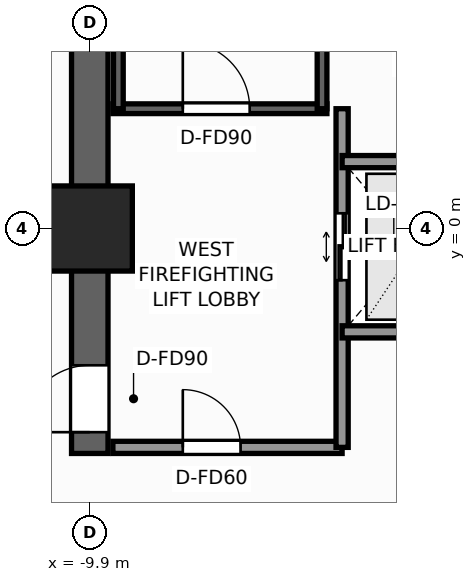
"""IFC4 building model, lengths in metres.
Left out: names, types, materials, properties, quantities, classifications, styles, units other than length and angle.
Written with IfcOpenShell. Run it as: python <this file> out.ifc"""

import sys

from ifc_helpers import new_model, si_unit, direction, frame, frame_2d, origin, origin_2d, place, context, subcontext, project, spatial, rectangle, extrude, element, fill, save


model = new_model("IFC4")
c1 = context("Model", 3, precision=1e-05, world=origin(), true_north=direction((0.0, 1.0)))
c2 = subcontext(c1, "Body", "Model", "MODEL_VIEW")
j1 = project(units=[si_unit("LENGTHUNIT", "METRE"), si_unit("PLANEANGLEUNIT", "RADIAN")], contexts=[c1])
p1 = place(None, origin())
s1 = spatial("IfcSite", under=j1, at=p1, CompositionType="ELEMENT")
p2 = place(p1, origin())
s2 = spatial("IfcBuilding", under=s1, at=p2, CompositionType="ELEMENT")
p3 = place(p2, frame((0.0, 0.0, 53.5)))
s3 = spatial("IfcBuildingStorey", under=s2, at=p3, CompositionType="ELEMENT", Elevation=53.5)
p4 = place(p3, frame((-9.9, -3.7, 0.0), z_axis=(0.0, 0.0, 1.0), x_axis=(0.0, 1.0, 0.0)))
e1 = element("IfcWall", 1, at=p4, inside=s3, PredefinedType="SHEAR", context=c2, shape_type="SweptSolid", body=[
    extrude(rectangle(XDim=13.3, YDim=0.6, at=frame_2d((6.65, 0.0))), origin(), (0.0, 0.0, 1.0), 3.3),
])
p5 = place(p4, frame((0.35, 0.0, 0.0)))
e2 = element("IfcOpeningElement", 2, at=p5, cuts=e1, PredefinedType="OPENING", context=c2, shape_type="SweptSolid", body=[
    extrude(rectangle(XDim=1.1, YDim=2.2, at=frame_2d((0.55, 1.1))), frame((0.0, 0.31, 0.0), z_axis=(0.0, -1.0, 0.0), x_axis=(1.0, 0.0, 0.0)), (0.0, 0.0, 1.0), 0.62),
])
p6 = place(p3, frame((-9.9, 0.0, 0.0), z_axis=(0.0, 0.0, 1.0), x_axis=(1.0, 0.0, 0.0)))
e3 = element("IfcColumn", 3, at=p6, inside=s3, PredefinedType="COLUMN", context=c2, shape_type="SweptSolid", body=[
    extrude(rectangle(XDim=1.4, YDim=1.4, at=origin_2d()), origin(), (0.0, 0.0, 1.0), 3.3),
])
p7 = place(p3, frame((-9.52, 1.97, 0.0), z_axis=(0.0, 0.0, 1.0), x_axis=(1.0, 0.0, 0.0)))
e4 = element("IfcWall", 4, at=p7, inside=s3, PredefinedType="SHEAR", context=c2, shape_type="SweptSolid", body=[
    extrude(rectangle(XDim=3.52, YDim=0.16, at=frame_2d((1.76, 0.0))), origin(), (0.0, 0.0, 1.0), 3.3),
])
p8 = place(p7, frame((1.15, 0.0, 0.0)))
e5 = element("IfcOpeningElement", 5, at=p8, cuts=e4, PredefinedType="OPENING", context=c2, shape_type="SweptSolid", body=[
    extrude(rectangle(XDim=1.1, YDim=2.2, at=frame_2d((0.55, 1.1))), frame((0.0, 0.09, 0.0), z_axis=(0.0, -1.0, 0.0), x_axis=(1.0, 0.0, 0.0)), (0.0, 0.0, 1.0), 0.18),
])
for number, where, z_axis, x_axis in (
    (6, (-9.43, 1.97, 0.0), (0.0, 0.0, 1.0), (0.0, 1.0, 0.0)),
    (7, (-6.08, 1.97, 0.0), (0.0, 0.0, 1.0), (0.0, 1.0, 0.0)),
):
    element("IfcWall", number, at=place(p3, frame(where, z_axis=z_axis, x_axis=x_axis)), inside=s3, PredefinedType="SHEAR", context=c2, shape_type="SweptSolid", body=[
        extrude(rectangle(XDim=7.56, YDim=0.16, at=frame_2d((3.78, 0.0))), origin(), (0.0, 0.0, 1.0), 3.3),
    ])
p9 = place(p3, frame((-9.52, -3.6, 0.0), z_axis=(0.0, 0.0, 1.0), x_axis=(1.0, 0.0, 0.0)))
e8 = element("IfcWall", 8, at=p9, inside=s3, PredefinedType="SOLIDWALL", context=c2, shape_type="SweptSolid", body=[
    extrude(rectangle(XDim=3.77, YDim=0.2, at=frame_2d((1.885, 0.0))), origin(), (0.0, 0.0, 1.0), 3.06),
])
p10 = place(p9, frame((1.15, 0.0, 0.0)))
e9 = element("IfcOpeningElement", 9, at=p10, cuts=e8, PredefinedType="OPENING", context=c2, shape_type="SweptSolid", body=[
    extrude(rectangle(XDim=0.95, YDim=2.06, at=frame_2d((0.475, 1.03))), frame((0.0, 0.11, 0.0), z_axis=(0.0, -1.0, 0.0), x_axis=(1.0, 0.0, 0.0)), (0.0, 0.0, 1.0), 0.22),
])
p11 = place(p3, frame((-5.75, -3.6, 0.0), z_axis=(0.0, 0.0, 1.0), x_axis=(0.0, 1.0, 0.0)))
e10 = element("IfcWall", 10, at=p11, inside=s3, PredefinedType="SOLIDWALL", context=c2, shape_type="SweptSolid", body=[
    extrude(rectangle(XDim=5.57, YDim=0.2, at=frame_2d((2.785, 0.0))), origin(), (0.0, 0.0, 1.0), 3.06),
])
p12 = place(p11, frame((2.75, 0.0, 0.0)))
e11 = element("IfcOpeningElement", 11, at=p12, cuts=e10, PredefinedType="OPENING", context=c2, shape_type="SweptSolid", body=[
    extrude(rectangle(XDim=1.1, YDim=2.2, at=frame_2d((0.55, 1.1))), frame((0.0, 0.11, 0.0), z_axis=(0.0, -1.0, 0.0), x_axis=(1.0, 0.0, 0.0)), (0.0, 0.0, 1.0), 0.22),
])
for number, where, z_axis, x_axis in (
    (12, (-5.75, -1.7, 0.0), (0.0, 0.0, 1.0), (1.0, 0.0, 0.0)),
    (13, (-5.75, 1.1, 0.0), (0.0, 0.0, 1.0), (1.0, 0.0, 0.0)),
):
    element("IfcWall", number, at=place(p3, frame(where, z_axis=z_axis, x_axis=x_axis)), inside=s3, PredefinedType="SOLIDWALL", context=c2, shape_type="SweptSolid", body=[
        extrude(rectangle(XDim=2.4, YDim=0.2, at=frame_2d((1.2, 0.0))), origin(), (0.0, 0.0, 1.0), 3.06),
    ])
p13 = place(p8, origin())
e14 = element("IfcDoor", 14, at=p13, inside=s3, OperationType="SINGLE_SWING_LEFT", PredefinedType="DOOR", context=c2, shape_type="SweptSolid", body=[
    extrude(rectangle(XDim=1.1, YDim=2.2, at=frame_2d((0.55, 1.1))), frame((0.0, 0.025, 0.0), z_axis=(0.0, -1.0, 0.0), x_axis=(1.0, 0.0, 0.0)), (0.0, 0.0, 1.0), 0.05),
])
fill(e5, e14)
p14 = place(p5, origin())
e15 = element("IfcDoor", 15, at=p14, inside=s3, OperationType="SINGLE_SWING_LEFT", PredefinedType="DOOR", context=c2, shape_type="SweptSolid", body=[
    extrude(rectangle(XDim=1.1, YDim=2.2, at=frame_2d((0.55, 1.1))), frame((0.0, 0.025, 0.0), z_axis=(0.0, -1.0, 0.0), x_axis=(1.0, 0.0, 0.0)), (0.0, 0.0, 1.0), 0.05),
])
fill(e2, e15)
p15 = place(p12, origin())
e16 = element("IfcDoor", 16, at=p15, inside=s3, OperationType="DOUBLE_DOOR_SLIDING", PredefinedType="DOOR", context=c2, shape_type="SweptSolid", body=[
    extrude(rectangle(XDim=1.1, YDim=2.2, at=frame_2d((0.55, 1.1))), frame((0.0, 0.025, 0.0), z_axis=(0.0, -1.0, 0.0), x_axis=(1.0, 0.0, 0.0)), (0.0, 0.0, 1.0), 0.05),
])
fill(e11, e16)
p16 = place(p10, origin())
e17 = element("IfcDoor", 17, at=p16, inside=s3, OperationType="SINGLE_SWING_LEFT", PredefinedType="DOOR", context=c2, shape_type="SweptSolid", body=[
    extrude(rectangle(XDim=0.95, YDim=2.06, at=frame_2d((0.475, 1.03))), frame((0.0, 0.025, 0.0), z_axis=(0.0, -1.0, 0.0), x_axis=(1.0, 0.0, 0.0)), (0.0, 0.0, 1.0), 0.05),
])
fill(e9, e17)
save(model, sys.argv[1])
